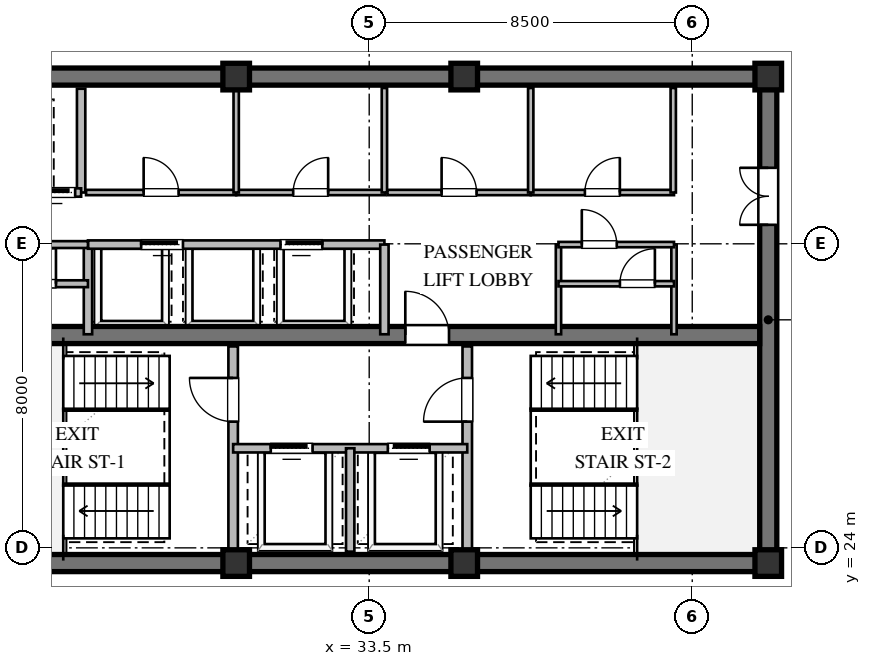
"""IFC4 building model, lengths in metres.
Left out: names, types, materials, properties, quantities, classifications, styles, units other than length and angle.
Written with IfcOpenShell. Run it as: python <this file> out.ifc"""

import sys

from ifc_helpers import new_model, si_unit, direction, frame, frame_2d, origin, origin_2d, place, context, subcontext, project, spatial, rectangle, extrude, element, fill, save


model = new_model("IFC4")
c1 = context("Model", 3, precision=1e-05, world=origin(), true_north=direction((0.0, 1.0)))
c2 = subcontext(c1, "Body", "Model", "MODEL_VIEW")
j1 = project(units=[si_unit("LENGTHUNIT", "METRE"), si_unit("PLANEANGLEUNIT", "RADIAN")], contexts=[c1])
p1 = place(None, origin())
s1 = spatial("IfcSite", under=j1, at=p1, CompositionType="ELEMENT")
p2 = place(p1, origin())
s2 = spatial("IfcBuilding", under=s1, at=p2, CompositionType="ELEMENT")
p3 = place(p2, frame((0.0, 0.0, 266.2)))
s3 = spatial("IfcBuildingStorey", under=s2, at=p3, CompositionType="ELEMENT", Elevation=266.2)
for number, where, z_axis, x_axis in (
    (1, (21.775, 23.6, 0.0), (0.0, 0.0, 1.0), (1.0, 0.0, 0.0)),
    (2, (21.775, 36.4, 0.0), (0.0, 0.0, 1.0), (1.0, 0.0, 0.0)),
):
    element("IfcWall", number, at=place(p3, frame(where, z_axis=z_axis, x_axis=x_axis)), inside=s3, PredefinedType="SHEAR", context=c2, shape_type="SweptSolid", body=[
        extrude(rectangle(XDim=22.45, YDim=0.45, at=frame_2d((11.225, 0.0))), origin(), (0.0, 0.0, 1.0), 3.56),
    ])
p4 = place(p3, frame((44.0, 23.825, 0.0), z_axis=(0.0, 0.0, 1.0), x_axis=(0.0, 1.0, 0.0)))
e3 = element("IfcWall", 3, at=p4, inside=s3, PredefinedType="SHEAR", context=c2, shape_type="SweptSolid", body=[
    extrude(rectangle(XDim=12.35, YDim=0.45, at=frame_2d((6.175, 0.0))), origin(), (0.0, 0.0, 1.0), 3.56),
])
p5 = place(p4, frame((8.675, 0.0, 0.0)))
e4 = element("IfcOpeningElement", 4, at=p5, cuts=e3, PredefinedType="OPENING", context=c2, shape_type="SweptSolid", body=[
    extrude(rectangle(XDim=1.5, YDim=2.15, at=frame_2d((0.75, 1.075))), frame((0.0, 0.235, 0.0), z_axis=(0.0, -1.0, 0.0), x_axis=(1.0, 0.0, 0.0)), (0.0, 0.0, 1.0), 0.47),
])
p6 = place(p3, frame((22.225, 29.6, 0.0), z_axis=(0.0, 0.0, 1.0), x_axis=(1.0, 0.0, 0.0)))
e5 = element("IfcWall", 5, at=p6, inside=s3, PredefinedType="SHEAR", context=c2, shape_type="SweptSolid", body=[
    extrude(rectangle(XDim=21.55, YDim=0.45, at=frame_2d((10.775, 0.0))), origin(), (0.0, 0.0, 1.0), 3.56),
])
p7 = place(p6, frame((12.225, 0.0, 0.0)))
e6 = element("IfcOpeningElement", 6, at=p7, cuts=e5, PredefinedType="OPENING", context=c2, shape_type="SweptSolid", body=[
    extrude(rectangle(XDim=1.15, YDim=2.1, at=frame_2d((0.575, 1.05))), frame((0.0, 0.235, 0.0), z_axis=(0.0, -1.0, 0.0), x_axis=(1.0, 0.0, 0.0)), (0.0, 0.0, 1.0), 0.47),
])
for number, where, z_axis, x_axis in (
    (7, (30.0, 23.6, 0.0), (0.0, 0.0, 1.0), (1.0, 0.0, 0.0)),
    (8, (36.0, 23.6, 0.0), (0.0, 0.0, 1.0), (1.0, 0.0, 0.0)),
    (9, (44.0, 23.6, 0.0), (0.0, 0.0, 1.0), (1.0, 0.0, 0.0)),
    (10, (44.0, 36.4, 0.0), (0.0, 0.0, 1.0), (1.0, 0.0, 0.0)),
    (11, (36.0, 36.4, 0.0), (0.0, 0.0, 1.0), (1.0, 0.0, 0.0)),
    (12, (30.0, 36.4, 0.0), (0.0, 0.0, 1.0), (1.0, 0.0, 0.0)),
):
    element("IfcColumn", number, at=place(p3, frame(where, z_axis=z_axis, x_axis=x_axis)), inside=s3, PredefinedType="COLUMN", context=c2, shape_type="SweptSolid", body=[
        extrude(rectangle(XDim=0.7, YDim=0.7, at=origin_2d()), origin(), (0.0, 0.0, 1.0), 3.8),
    ])
p8 = place(p3, frame((27.093, 20.428, 0.0), z_axis=(0.0, 0.0, 1.0), x_axis=(-0.826047009588, 0.563601222454, 0.0)))
e13 = element("IfcWall", 13, at=p8, inside=s3, PredefinedType="STANDARD", context=c2, shape_type="SweptSolid", body=[
    extrude(rectangle(XDim=6.074, YDim=0.32, at=frame_2d((3.037, 0.0))), origin(), (0.0, 0.0, 1.0), 2.35),
])
p9 = place(p3, frame((29.92, 23.9, 0.0), z_axis=(0.0, 0.0, 1.0), x_axis=(0.0, 1.0, 0.0)))
e14 = element("IfcWall", 14, at=p9, inside=s3, PredefinedType="SOLIDWALL", context=c2, shape_type="SweptSolid", body=[
    extrude(rectangle(XDim=5.4, YDim=0.25, at=frame_2d((2.7, 0.0))), origin(), (0.0, 0.0, 1.0), 3.006),
])
p10 = place(p9, frame((3.421, 0.0, 0.0)))
e15 = element("IfcOpeningElement", 15, at=p10, cuts=e14, PredefinedType="OPENING", context=c2, shape_type="SweptSolid", body=[
    extrude(rectangle(XDim=1.15, YDim=2.1, at=frame_2d((0.575, 1.05))), frame((0.0, 0.135, 0.0), z_axis=(0.0, -1.0, 0.0), x_axis=(1.0, 0.0, 0.0)), (0.0, 0.0, 1.0), 0.27),
])
p11 = place(p3, frame((36.08, 23.9, 0.0), z_axis=(0.0, 0.0, 1.0), x_axis=(0.0, 1.0, 0.0)))
e16 = element("IfcWall", 16, at=p11, inside=s3, PredefinedType="SOLIDWALL", context=c2, shape_type="SweptSolid", body=[
    extrude(rectangle(XDim=5.4, YDim=0.25, at=frame_2d((2.7, 0.0))), origin(), (0.0, 0.0, 1.0), 3.56),
])
p12 = place(p11, frame((3.421, 0.0, 0.0)))
e17 = element("IfcOpeningElement", 17, at=p12, cuts=e16, PredefinedType="OPENING", context=c2, shape_type="SweptSolid", body=[
    extrude(rectangle(XDim=1.15, YDim=2.1, at=frame_2d((0.575, 1.05))), frame((0.0, 0.135, 0.0), z_axis=(0.0, -1.0, 0.0), x_axis=(1.0, 0.0, 0.0)), (0.0, 0.0, 1.0), 0.27),
])
p13 = place(p3, frame((29.92, 26.62, 0.0), z_axis=(0.0, 0.0, 1.0), x_axis=(1.0, 0.0, 0.0)))
e18 = element("IfcWall", 18, at=p13, inside=s3, PredefinedType="SOLIDWALL", context=c2, shape_type="SweptSolid", body=[
    extrude(rectangle(XDim=6.16, YDim=0.22, at=frame_2d((3.08, 0.0))), origin(), (0.0, 0.0, 1.0), 3.56),
])
p14 = place(p13, frame((0.99, 0.0, 0.0)))
e19 = element("IfcOpeningElement", 19, at=p14, cuts=e18, PredefinedType="OPENING", context=c2, shape_type="SweptSolid", body=[
    extrude(rectangle(XDim=1.1, YDim=2.1, at=frame_2d((0.55, 1.05))), frame((0.0, 0.12, 0.0), z_axis=(0.0, -1.0, 0.0), x_axis=(1.0, 0.0, 0.0)), (0.0, 0.0, 1.0), 0.24),
])
p15 = place(p13, frame((4.07, 0.0, 0.0)))
e20 = element("IfcOpeningElement", 20, at=p15, cuts=e18, PredefinedType="OPENING", context=c2, shape_type="SweptSolid", body=[
    extrude(rectangle(XDim=1.1, YDim=2.1, at=frame_2d((0.55, 1.05))), frame((0.0, 0.12, 0.0), z_axis=(0.0, -1.0, 0.0), x_axis=(1.0, 0.0, 0.0)), (0.0, 0.0, 1.0), 0.24),
])
p16 = place(p3, frame((33.0, 23.9, 0.0), z_axis=(0.0, 0.0, 1.0), x_axis=(0.0, 1.0, 0.0)))
e21 = element("IfcWall", 21, at=p16, inside=s3, PredefinedType="SOLIDWALL", context=c2, shape_type="SweptSolid", body=[
    extrude(rectangle(XDim=2.72, YDim=0.22, at=frame_2d((1.36, 0.0))), origin(), (0.0, 0.0, 1.0), 3.56),
])
p17 = place(p3, frame((25.92, 33.35, 0.0), z_axis=(0.0, 0.0, 1.0), x_axis=(0.0, 1.0, 0.0)))
e22 = element("IfcWall", 22, at=p17, inside=s3, PredefinedType="SOLIDWALL", context=c2, shape_type="SweptSolid", body=[
    extrude(rectangle(XDim=2.73, YDim=0.22, at=frame_2d((1.365, 0.0))), origin(), (0.0, 0.0, 1.0), 3.56),
])
p18 = place(p3, frame((22.35, 33.35, 0.0), z_axis=(0.0, 0.0, 1.0), x_axis=(1.0, 0.0, 0.0)))
e23 = element("IfcWall", 23, at=p18, inside=s3, PredefinedType="SOLIDWALL", context=c2, shape_type="SweptSolid", body=[
    extrude(rectangle(XDim=3.57, YDim=0.22, at=frame_2d((1.785, 0.0))), origin(), (0.0, 0.0, 1.0), 3.56),
])
p19 = place(p18, frame((2.213, 0.0, 0.0)))
e24 = element("IfcOpeningElement", 24, at=p19, cuts=e23, PredefinedType="OPENING", context=c2, shape_type="SweptSolid", body=[
    extrude(rectangle(XDim=1.2, YDim=2.1, at=frame_2d((0.6, 1.05))), frame((0.0, 0.12, 0.0), z_axis=(0.0, -1.0, 0.0), x_axis=(1.0, 0.0, 0.0)), (0.0, 0.0, 1.0), 0.24),
])
p20 = place(p3, frame((26.1, 29.62, 0.0), z_axis=(0.0, 0.0, 1.0), x_axis=(0.0, 1.0, 0.0)))
e25 = element("IfcWall", 25, at=p20, inside=s3, PredefinedType="SOLIDWALL", context=c2, shape_type="SweptSolid", body=[
    extrude(rectangle(XDim=2.36, YDim=0.22, at=frame_2d((1.18, 0.0))), origin(), (0.0, 0.0, 1.0), 3.56),
])
p21 = place(p3, frame((26.1, 31.98, 0.0), z_axis=(0.0, 0.0, 1.0), x_axis=(1.0, 0.0, 0.0)))
e26 = element("IfcWall", 26, at=p21, inside=s3, PredefinedType="SOLIDWALL", context=c2, shape_type="SweptSolid", body=[
    extrude(rectangle(XDim=7.8, YDim=0.22, at=frame_2d((3.9, 0.0))), origin(), (0.0, 0.0, 1.0), 3.56),
])
p22 = place(p21, frame((1.4, 0.0, 0.0)))
e27 = element("IfcOpeningElement", 27, at=p22, cuts=e26, PredefinedType="OPENING", context=c2, shape_type="SweptSolid", body=[
    extrude(rectangle(XDim=1.1, YDim=2.1, at=frame_2d((0.55, 1.05))), frame((0.0, 0.12, 0.0), z_axis=(0.0, -1.0, 0.0), x_axis=(1.0, 0.0, 0.0)), (0.0, 0.0, 1.0), 0.24),
])
p23 = place(p21, frame((5.066, 0.0, 0.0)))
e28 = element("IfcOpeningElement", 28, at=p23, cuts=e26, PredefinedType="OPENING", context=c2, shape_type="SweptSolid", body=[
    extrude(rectangle(XDim=1.1, YDim=2.1, at=frame_2d((0.55, 1.05))), frame((0.0, 0.12, 0.0), z_axis=(0.0, -1.0, 0.0), x_axis=(1.0, 0.0, 0.0)), (0.0, 0.0, 1.0), 0.24),
])
p24 = place(p3, frame((33.9, 29.62, 0.0), z_axis=(0.0, 0.0, 1.0), x_axis=(0.0, 1.0, 0.0)))
e29 = element("IfcWall", 29, at=p24, inside=s3, PredefinedType="SOLIDWALL", context=c2, shape_type="SweptSolid", body=[
    extrude(rectangle(XDim=2.36, YDim=0.22, at=frame_2d((1.18, 0.0))), origin(), (0.0, 0.0, 1.0), 3.56),
])
p25 = place(p3, frame((26.05, 33.35, 0.0), z_axis=(0.0, 0.0, 1.0), x_axis=(1.0, 0.0, 0.0)))
e30 = element("IfcWall", 30, at=p25, inside=s3, PredefinedType="PARTITIONING", context=c2, shape_type="SweptSolid", body=[
    extrude(rectangle(XDim=3.95, YDim=0.14, at=frame_2d((1.975, 0.0))), origin(), (0.0, 0.0, 1.0), 3.56),
])
p26 = place(p25, frame((1.515, 0.0, 0.0)))
e31 = element("IfcOpeningElement", 31, at=p26, cuts=e30, PredefinedType="OPENING", context=c2, shape_type="SweptSolid", body=[
    extrude(rectangle(XDim=0.92, YDim=2.1, at=frame_2d((0.46, 1.05))), frame((0.0, 0.08, 0.0), z_axis=(0.0, -1.0, 0.0), x_axis=(1.0, 0.0, 0.0)), (0.0, 0.0, 1.0), 0.16),
])
p27 = place(p3, frame((30.0, 33.35, 0.0), z_axis=(0.0, 0.0, 1.0), x_axis=(1.0, 0.0, 0.0)))
e32 = element("IfcWall", 32, at=p27, inside=s3, PredefinedType="PARTITIONING", context=c2, shape_type="SweptSolid", body=[
    extrude(rectangle(XDim=3.92, YDim=0.14, at=frame_2d((1.96, 0.0))), origin(), (0.0, 0.0, 1.0), 3.56),
])
p28 = place(p27, frame((1.5, 0.0, 0.0)))
e33 = element("IfcOpeningElement", 33, at=p28, cuts=e32, PredefinedType="OPENING", context=c2, shape_type="SweptSolid", body=[
    extrude(rectangle(XDim=0.92, YDim=2.1, at=frame_2d((0.46, 1.05))), frame((0.0, 0.08, 0.0), z_axis=(0.0, -1.0, 0.0), x_axis=(1.0, 0.0, 0.0)), (0.0, 0.0, 1.0), 0.16),
])
for number, where, z_axis, x_axis in (
    (34, (30.0, 33.35, 0.0), (0.0, 0.0, 1.0), (0.0, 1.0, 0.0)),
    (35, (33.9, 33.35, 0.0), (0.0, 0.0, 1.0), (0.0, 1.0, 0.0)),
):
    element("IfcWall", number, at=place(p3, frame(where, z_axis=z_axis, x_axis=x_axis)), inside=s3, PredefinedType="PARTITIONING", context=c2, shape_type="SweptSolid", body=[
        extrude(rectangle(XDim=2.75, YDim=0.14, at=frame_2d((1.375, 0.0))), origin(), (0.0, 0.0, 1.0), 3.56),
    ])
p29 = place(p3, frame((33.98, 33.35, 0.0), z_axis=(0.0, 0.0, 1.0), x_axis=(1.0, 0.0, 0.0)))
e36 = element("IfcWall", 36, at=p29, inside=s3, PredefinedType="PARTITIONING", context=c2, shape_type="SweptSolid", body=[
    extrude(rectangle(XDim=3.77, YDim=0.14, at=frame_2d((1.885, 0.0))), origin(), (0.0, 0.0, 1.0), 3.56),
])
p30 = place(p29, frame((1.425, 0.0, 0.0)))
e37 = element("IfcOpeningElement", 37, at=p30, cuts=e36, PredefinedType="OPENING", context=c2, shape_type="SweptSolid", body=[
    extrude(rectangle(XDim=0.92, YDim=2.1, at=frame_2d((0.46, 1.05))), frame((0.0, 0.08, 0.0), z_axis=(0.0, -1.0, 0.0), x_axis=(1.0, 0.0, 0.0)), (0.0, 0.0, 1.0), 0.16),
])
p31 = place(p3, frame((37.75, 33.35, 0.0), z_axis=(0.0, 0.0, 1.0), x_axis=(1.0, 0.0, 0.0)))
e38 = element("IfcWall", 38, at=p31, inside=s3, PredefinedType="PARTITIONING", context=c2, shape_type="SweptSolid", body=[
    extrude(rectangle(XDim=3.77, YDim=0.14, at=frame_2d((1.885, 0.0))), origin(), (0.0, 0.0, 1.0), 3.56),
])
p32 = place(p31, frame((1.425, 0.0, 0.0)))
e39 = element("IfcOpeningElement", 39, at=p32, cuts=e38, PredefinedType="OPENING", context=c2, shape_type="SweptSolid", body=[
    extrude(rectangle(XDim=0.92, YDim=2.1, at=frame_2d((0.46, 1.05))), frame((0.0, 0.08, 0.0), z_axis=(0.0, -1.0, 0.0), x_axis=(1.0, 0.0, 0.0)), (0.0, 0.0, 1.0), 0.16),
])
for number, where, z_axis, x_axis in (
    (40, (37.75, 33.35, 0.0), (0.0, 0.0, 1.0), (0.0, 1.0, 0.0)),
    (41, (41.5, 33.35, 0.0), (0.0, 0.0, 1.0), (0.0, 1.0, 0.0)),
):
    element("IfcWall", number, at=place(p3, frame(where, z_axis=z_axis, x_axis=x_axis)), inside=s3, PredefinedType="PARTITIONING", context=c2, shape_type="SweptSolid", body=[
        extrude(rectangle(XDim=2.75, YDim=0.14, at=frame_2d((1.375, 0.0))), origin(), (0.0, 0.0, 1.0), 3.56),
    ])
p33 = place(p3, frame((22.35, 30.95, 0.0), z_axis=(0.0, 0.0, 1.0), x_axis=(1.0, 0.0, 0.0)))
e42 = element("IfcWall", 42, at=p33, inside=s3, PredefinedType="PARTITIONING", context=c2, shape_type="SweptSolid", body=[
    extrude(rectangle(XDim=3.75, YDim=0.18, at=frame_2d((1.875, 0.0))), origin(), (0.0, 0.0, 1.0), 3.56),
])
p34 = place(p33, frame((1.988, 0.0, 0.0)))
e43 = element("IfcOpeningElement", 43, at=p34, cuts=e42, PredefinedType="OPENING", context=c2, shape_type="SweptSolid", body=[
    extrude(rectangle(XDim=0.92, YDim=2.1, at=frame_2d((0.46, 1.05))), frame((0.0, 0.1, 0.0), z_axis=(0.0, -1.0, 0.0), x_axis=(1.0, 0.0, 0.0)), (0.0, 0.0, 1.0), 0.2),
])
p35 = place(p3, frame((22.35, 31.98, 0.0), z_axis=(0.0, 0.0, 1.0), x_axis=(1.0, 0.0, 0.0)))
e44 = element("IfcWall", 44, at=p35, inside=s3, PredefinedType="PARTITIONING", context=c2, shape_type="SweptSolid", body=[
    extrude(rectangle(XDim=3.75, YDim=0.18, at=frame_2d((1.875, 0.0))), origin(), (0.0, 0.0, 1.0), 3.56),
])
p36 = place(p35, frame((1.238, 0.0, 0.0)))
e45 = element("IfcOpeningElement", 45, at=p36, cuts=e44, PredefinedType="OPENING", context=c2, shape_type="SweptSolid", body=[
    extrude(rectangle(XDim=0.92, YDim=2.1, at=frame_2d((0.46, 1.05))), frame((0.0, 0.1, 0.0), z_axis=(0.0, -1.0, 0.0), x_axis=(1.0, 0.0, 0.0)), (0.0, 0.0, 1.0), 0.2),
])
for number, where, z_axis, x_axis in (
    (46, (38.48, 29.62, 0.0), (0.0, 0.0, 1.0), (0.0, 1.0, 0.0)),
    (47, (41.52, 29.62, 0.0), (0.0, 0.0, 1.0), (0.0, 1.0, 0.0)),
):
    element("IfcWall", number, at=place(p3, frame(where, z_axis=z_axis, x_axis=x_axis)), inside=s3, PredefinedType="PARTITIONING", context=c2, shape_type="SweptSolid", body=[
        extrude(rectangle(XDim=2.36, YDim=0.14, at=frame_2d((1.18, 0.0))), origin(), (0.0, 0.0, 1.0), 3.56),
    ])
p37 = place(p3, frame((38.48, 30.95, 0.0), z_axis=(0.0, 0.0, 1.0), x_axis=(1.0, 0.0, 0.0)))
e48 = element("IfcWall", 48, at=p37, inside=s3, PredefinedType="PARTITIONING", context=c2, shape_type="SweptSolid", body=[
    extrude(rectangle(XDim=3.04, YDim=0.14, at=frame_2d((1.52, 0.0))), origin(), (0.0, 0.0, 1.0), 3.56),
])
p38 = place(p37, frame((1.617, 0.0, 0.0)))
e49 = element("IfcOpeningElement", 49, at=p38, cuts=e48, PredefinedType="OPENING", context=c2, shape_type="SweptSolid", body=[
    extrude(rectangle(XDim=0.92, YDim=2.1, at=frame_2d((0.46, 1.05))), frame((0.0, 0.08, 0.0), z_axis=(0.0, -1.0, 0.0), x_axis=(1.0, 0.0, 0.0)), (0.0, 0.0, 1.0), 0.16),
])
p39 = place(p3, frame((38.48, 31.98, 0.0), z_axis=(0.0, 0.0, 1.0), x_axis=(1.0, 0.0, 0.0)))
e50 = element("IfcWall", 50, at=p39, inside=s3, PredefinedType="PARTITIONING", context=c2, shape_type="SweptSolid", body=[
    extrude(rectangle(XDim=3.04, YDim=0.14, at=frame_2d((1.52, 0.0))), origin(), (0.0, 0.0, 1.0), 3.56),
])
p40 = place(p39, frame((0.614, 0.0, 0.0)))
e51 = element("IfcOpeningElement", 51, at=p40, cuts=e50, PredefinedType="OPENING", context=c2, shape_type="SweptSolid", body=[
    extrude(rectangle(XDim=0.92, YDim=2.1, at=frame_2d((0.46, 1.05))), frame((0.0, 0.08, 0.0), z_axis=(0.0, -1.0, 0.0), x_axis=(1.0, 0.0, 0.0)), (0.0, 0.0, 1.0), 0.16),
])
p41 = place(p10, origin())
e52 = element("IfcDoor", 52, at=p41, inside=s3, OperationType="SINGLE_SWING_RIGHT", PredefinedType="DOOR", context=c2, shape_type="SweptSolid", body=[
    extrude(rectangle(XDim=1.15, YDim=2.1, at=frame_2d((0.575, 1.05))), frame((0.0, 0.025, 0.0), z_axis=(0.0, -1.0, 0.0), x_axis=(1.0, 0.0, 0.0)), (0.0, 0.0, 1.0), 0.05),
])
fill(e15, e52)
p42 = place(p12, origin())
e53 = element("IfcDoor", 53, at=p42, inside=s3, OperationType="SINGLE_SWING_LEFT", PredefinedType="DOOR", context=c2, shape_type="SweptSolid", body=[
    extrude(rectangle(XDim=1.15, YDim=2.1, at=frame_2d((0.575, 1.05))), frame((0.0, 0.025, 0.0), z_axis=(0.0, -1.0, 0.0), x_axis=(1.0, 0.0, 0.0)), (0.0, 0.0, 1.0), 0.05),
])
fill(e17, e53)
p43 = place(p14, origin())
e54 = element("IfcDoor", 54, at=p43, inside=s3, OperationType="SLIDING_TO_LEFT", PredefinedType="DOOR", context=c2, shape_type="SweptSolid", body=[
    extrude(rectangle(XDim=1.1, YDim=2.1, at=frame_2d((0.55, 1.05))), frame((0.0, 0.025, 0.0), z_axis=(0.0, -1.0, 0.0), x_axis=(1.0, 0.0, 0.0)), (0.0, 0.0, 1.0), 0.05),
])
fill(e19, e54)
p44 = place(p15, origin())
e55 = element("IfcDoor", 55, at=p44, inside=s3, OperationType="SLIDING_TO_RIGHT", PredefinedType="DOOR", context=c2, shape_type="SweptSolid", body=[
    extrude(rectangle(XDim=1.1, YDim=2.1, at=frame_2d((0.55, 1.05))), frame((0.0, 0.025, 0.0), z_axis=(0.0, -1.0, 0.0), x_axis=(1.0, 0.0, 0.0)), (0.0, 0.0, 1.0), 0.05),
])
fill(e20, e55)
p45 = place(p7, origin())
e56 = element("IfcDoor", 56, at=p45, inside=s3, OperationType="SINGLE_SWING_LEFT", PredefinedType="DOOR", context=c2, shape_type="SweptSolid", body=[
    extrude(rectangle(XDim=1.15, YDim=2.1, at=frame_2d((0.575, 1.05))), frame((0.0, 0.025, 0.0), z_axis=(0.0, -1.0, 0.0), x_axis=(1.0, 0.0, 0.0)), (0.0, 0.0, 1.0), 0.05),
])
fill(e6, e56)
p46 = place(p5, origin())
e57 = element("IfcDoor", 57, at=p46, inside=s3, OperationType="DOUBLE_DOOR_SINGLE_SWING", PredefinedType="DOOR", context=c2, shape_type="SweptSolid", body=[
    extrude(rectangle(XDim=1.5, YDim=2.15, at=frame_2d((0.75, 1.075))), frame((0.0, 0.025, 0.0), z_axis=(0.0, -1.0, 0.0), x_axis=(1.0, 0.0, 0.0)), (0.0, 0.0, 1.0), 0.05),
])
fill(e4, e57)
p47 = place(p19, origin())
e58 = element("IfcDoor", 58, at=p47, inside=s3, OperationType="SLIDING_TO_LEFT", PredefinedType="DOOR", context=c2, shape_type="SweptSolid", body=[
    extrude(rectangle(XDim=1.2, YDim=2.1, at=frame_2d((0.6, 1.05))), frame((0.0, 0.025, 0.0), z_axis=(0.0, -1.0, 0.0), x_axis=(1.0, 0.0, 0.0)), (0.0, 0.0, 1.0), 0.05),
])
fill(e24, e58)
p48 = place(p22, origin())
e59 = element("IfcDoor", 59, at=p48, inside=s3, OperationType="SLIDING_TO_LEFT", PredefinedType="DOOR", context=c2, shape_type="SweptSolid", body=[
    extrude(rectangle(XDim=1.1, YDim=2.1, at=frame_2d((0.55, 1.05))), frame((0.0, 0.025, 0.0), z_axis=(0.0, -1.0, 0.0), x_axis=(1.0, 0.0, 0.0)), (0.0, 0.0, 1.0), 0.05),
])
fill(e27, e59)
p49 = place(p23, origin())
e60 = element("IfcDoor", 60, at=p49, inside=s3, OperationType="SLIDING_TO_RIGHT", PredefinedType="DOOR", context=c2, shape_type="SweptSolid", body=[
    extrude(rectangle(XDim=1.1, YDim=2.1, at=frame_2d((0.55, 1.05))), frame((0.0, 0.025, 0.0), z_axis=(0.0, -1.0, 0.0), x_axis=(1.0, 0.0, 0.0)), (0.0, 0.0, 1.0), 0.05),
])
fill(e28, e60)
p50 = place(p26, origin())
e61 = element("IfcDoor", 61, at=p50, inside=s3, OperationType="SINGLE_SWING_LEFT", PredefinedType="DOOR", context=c2, shape_type="SweptSolid", body=[
    extrude(rectangle(XDim=0.92, YDim=2.1, at=frame_2d((0.46, 1.05))), frame((0.0, 0.025, 0.0), z_axis=(0.0, -1.0, 0.0), x_axis=(1.0, 0.0, 0.0)), (0.0, 0.0, 1.0), 0.05),
])
fill(e31, e61)
p51 = place(p28, origin())
e62 = element("IfcDoor", 62, at=p51, inside=s3, OperationType="SINGLE_SWING_RIGHT", PredefinedType="DOOR", context=c2, shape_type="SweptSolid", body=[
    extrude(rectangle(XDim=0.92, YDim=2.1, at=frame_2d((0.46, 1.05))), frame((0.0, 0.025, 0.0), z_axis=(0.0, -1.0, 0.0), x_axis=(1.0, 0.0, 0.0)), (0.0, 0.0, 1.0), 0.05),
])
fill(e33, e62)
p52 = place(p30, origin())
e63 = element("IfcDoor", 63, at=p52, inside=s3, OperationType="SINGLE_SWING_LEFT", PredefinedType="DOOR", context=c2, shape_type="SweptSolid", body=[
    extrude(rectangle(XDim=0.92, YDim=2.1, at=frame_2d((0.46, 1.05))), frame((0.0, 0.025, 0.0), z_axis=(0.0, -1.0, 0.0), x_axis=(1.0, 0.0, 0.0)), (0.0, 0.0, 1.0), 0.05),
])
fill(e37, e63)
p53 = place(p32, origin())
e64 = element("IfcDoor", 64, at=p53, inside=s3, OperationType="SINGLE_SWING_RIGHT", PredefinedType="DOOR", context=c2, shape_type="SweptSolid", body=[
    extrude(rectangle(XDim=0.92, YDim=2.1, at=frame_2d((0.46, 1.05))), frame((0.0, 0.025, 0.0), z_axis=(0.0, -1.0, 0.0), x_axis=(1.0, 0.0, 0.0)), (0.0, 0.0, 1.0), 0.05),
])
fill(e39, e64)
p54 = place(p34, origin())
e65 = element("IfcDoor", 65, at=p54, inside=s3, OperationType="SINGLE_SWING_RIGHT", PredefinedType="DOOR", context=c2, shape_type="SweptSolid", body=[
    extrude(rectangle(XDim=0.92, YDim=2.1, at=frame_2d((0.46, 1.05))), frame((0.0, 0.025, 0.0), z_axis=(0.0, -1.0, 0.0), x_axis=(1.0, 0.0, 0.0)), (0.0, 0.0, 1.0), 0.05),
])
fill(e43, e65)
p55 = place(p40, origin())
e66 = element("IfcDoor", 66, at=p55, inside=s3, OperationType="SINGLE_SWING_LEFT", PredefinedType="DOOR", context=c2, shape_type="SweptSolid", body=[
    extrude(rectangle(XDim=0.92, YDim=2.1, at=frame_2d((0.46, 1.05))), frame((0.0, 0.025, 0.0), z_axis=(0.0, -1.0, 0.0), x_axis=(1.0, 0.0, 0.0)), (0.0, 0.0, 1.0), 0.05),
])
fill(e51, e66)
p56 = place(p38, origin())
e67 = element("IfcDoor", 67, at=p56, inside=s3, OperationType="SINGLE_SWING_RIGHT", PredefinedType="DOOR", context=c2, shape_type="SweptSolid", body=[
    extrude(rectangle(XDim=0.92, YDim=2.1, at=frame_2d((0.46, 1.05))), frame((0.0, 0.025, 0.0), z_axis=(0.0, -1.0, 0.0), x_axis=(1.0, 0.0, 0.0)), (0.0, 0.0, 1.0), 0.05),
])
fill(e49, e67)
save(model, sys.argv[1])
